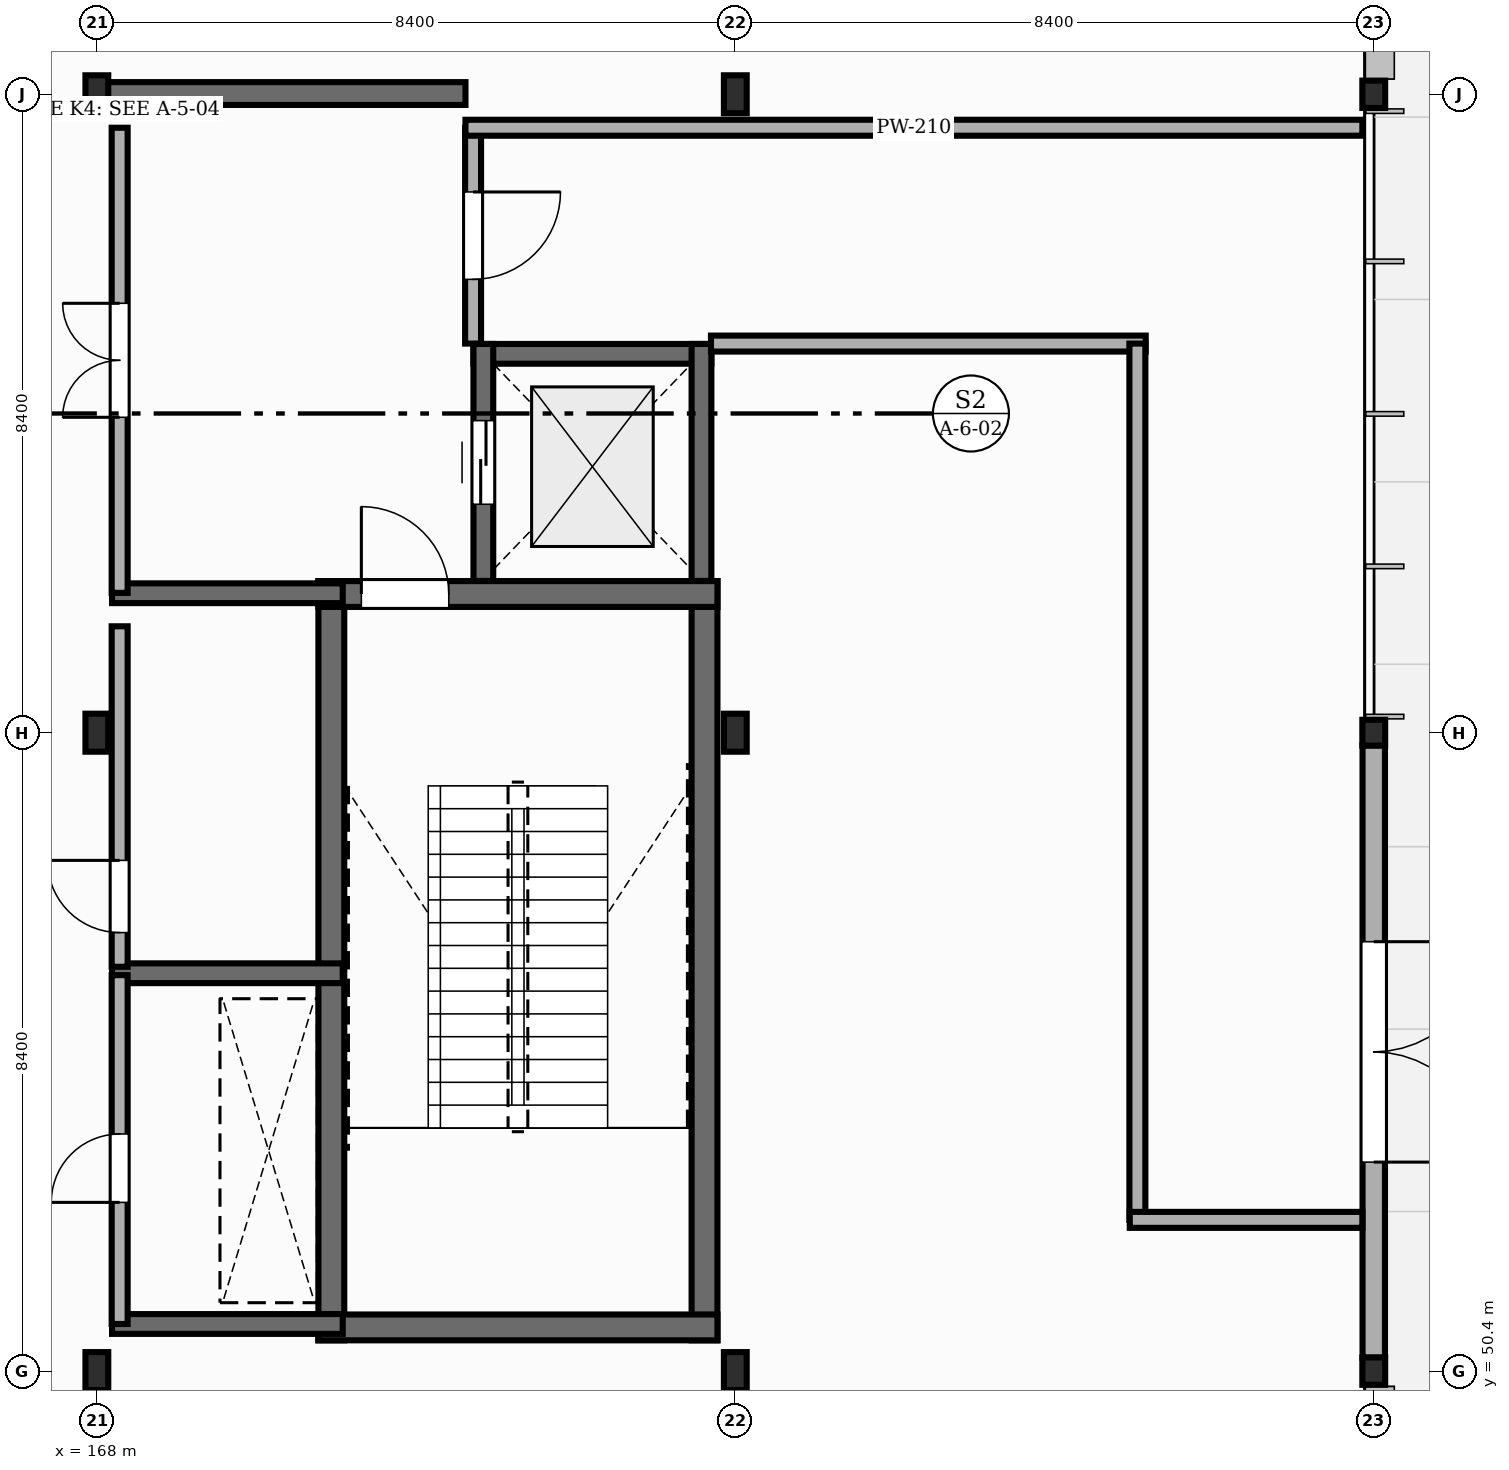
"""IFC4 building model, lengths in metres.
Left out: names, types, materials, properties, quantities, classifications, styles, units other than length and angle.
Written with IfcOpenShell. Run it as: python <this file> out.ifc"""

import sys

from ifc_helpers import new_model, si_unit, direction, frame, frame_2d, origin, origin_2d, place, context, subcontext, project, spatial, rectangle, i_section, extrude, element, fill, save


model = new_model("IFC4")
c1 = context("Model", 3, precision=1e-05, world=origin(), true_north=direction((0.0, 1.0)))
c2 = subcontext(c1, "Body", "Model", "MODEL_VIEW")
j1 = project(units=[si_unit("LENGTHUNIT", "METRE"), si_unit("PLANEANGLEUNIT", "RADIAN")], contexts=[c1])
p1 = place(None, origin())
s1 = spatial("IfcSite", under=j1, at=p1, CompositionType="ELEMENT")
p2 = place(p1, origin())
s2 = spatial("IfcBuilding", under=s1, at=p2, CompositionType="ELEMENT")
p3 = place(p2, origin())
s3 = spatial("IfcBuildingStorey", under=s2, at=p3, CompositionType="ELEMENT", Elevation=0.0)
for number, where, z_axis, x_axis in (
    (1, (168.0, 50.4, 0.0), (0.0, 0.0, 1.0), (1.0, 0.0, 0.0)),
    (2, (168.0, 58.8, 0.0), (0.0, 0.0, 1.0), (1.0, 0.0, 0.0)),
    (3, (168.0, 67.2, 0.0), (0.0, 0.0, 1.0), (1.0, 0.0, 0.0)),
    (4, (176.4, 50.4, 0.0), (0.0, 0.0, 1.0), (1.0, 0.0, 0.0)),
    (5, (176.4, 58.8, 0.0), (0.0, 0.0, 1.0), (1.0, 0.0, 0.0)),
    (6, (176.4, 67.2, 0.0), (0.0, 0.0, 1.0), (1.0, 0.0, 0.0)),
):
    element("IfcColumn", number, at=place(p3, frame(where, z_axis=z_axis, x_axis=x_axis)), inside=s3, PredefinedType="COLUMN", context=c2, shape_type="SweptSolid", body=[
        extrude(i_section(OverallWidth=0.3, OverallDepth=0.5, WebThickness=0.014, FlangeThickness=0.028, FilletRadius=0.027, at=origin_2d()), origin(), (0.0, 0.0, 1.0), 5.4),
    ])
p4 = place(p3, frame((184.8, 50.4, 0.0), z_axis=(0.0, 0.0, 1.0), x_axis=(1.0, 0.0, 0.0)))
e7 = element("IfcColumn", 7, at=p4, inside=s3, PredefinedType="COLUMN", context=c2, shape_type="SweptSolid", body=[
    extrude(i_section(OverallWidth=0.3, OverallDepth=0.36, WebThickness=0.012, FlangeThickness=0.022, FilletRadius=0.027, at=origin_2d()), origin(), (0.0, 0.0, 1.0), 5.4),
])
p5 = place(p3, frame((184.8, 58.8, 0.0), z_axis=(0.0, 0.0, 1.0), x_axis=(1.0, 0.0, 0.0)))
e8 = element("IfcColumn", 8, at=p5, inside=s3, PredefinedType="COLUMN", context=c2, shape_type="SweptSolid", body=[
    extrude(i_section(OverallWidth=0.3, OverallDepth=0.34, WebThickness=0.012, FlangeThickness=0.021, FilletRadius=0.027, at=origin_2d()), origin(), (0.0, 0.0, 1.0), 5.4),
])
p6 = place(p3, frame((184.8, 67.2, 0.0), z_axis=(0.0, 0.0, 1.0), x_axis=(1.0, 0.0, 0.0)))
e9 = element("IfcColumn", 9, at=p6, inside=s3, PredefinedType="COLUMN", context=c2, shape_type="SweptSolid", body=[
    extrude(i_section(OverallWidth=0.3, OverallDepth=0.36, WebThickness=0.012, FlangeThickness=0.022, FilletRadius=0.027, at=origin_2d()), origin(), (0.0, 0.0, 1.0), 5.4),
])
p7 = place(p3, frame((184.8, 58.634, 0.0), z_axis=(0.0, 0.0, 1.0), x_axis=(0.0, -1.0, 0.0)))
e10 = element("IfcWall", 10, at=p7, inside=s3, PredefinedType="STANDARD", context=c2, shape_type="SweptSolid", body=[
    extrude(rectangle(XDim=8.058, YDim=0.295, at=frame_2d((4.029, 0.0))), origin(), (0.0, 0.0, 1.0), 4.797),
])
p8 = place(p7, frame((2.584, 0.0, 0.0)))
e11 = element("IfcOpeningElement", 11, at=p8, cuts=e10, PredefinedType="OPENING", context=c2, shape_type="SweptSolid", body=[
    extrude(rectangle(XDim=2.9, YDim=2.38, at=frame_2d((1.45, 1.19))), frame((0.0, 0.157, 0.0), z_axis=(0.0, -1.0, 0.0), x_axis=(1.0, 0.0, 0.0)), (0.0, 0.0, 1.0), 0.315),
])
for number, where, z_axis, x_axis in (
    (12, (171.085, 50.805, 0.0), (0.0, 0.0, 1.0), (0.0, 1.0, 0.0)),
    (13, (175.995, 50.805, 0.0), (0.0, 0.0, 1.0), (0.0, 1.0, 0.0)),
):
    element("IfcWall", number, at=place(p3, frame(where, z_axis=z_axis, x_axis=x_axis)), inside=s3, PredefinedType="SHEAR", context=c2, shape_type="SweptSolid", body=[
        extrude(rectangle(XDim=9.99, YDim=0.34, at=frame_2d((4.995, 0.0))), origin(), (0.0, 0.0, 1.0), 5.175),
    ])
p9 = place(p3, frame((170.915, 50.975, 0.0), z_axis=(0.0, 0.0, 1.0), x_axis=(1.0, 0.0, 0.0)))
e14 = element("IfcWall", 14, at=p9, inside=s3, PredefinedType="SHEAR", context=c2, shape_type="SweptSolid", body=[
    extrude(rectangle(XDim=5.25, YDim=0.34, at=frame_2d((2.625, 0.0))), origin(), (0.0, 0.0, 1.0), 5.175),
])
p10 = place(p3, frame((170.915, 60.625, 0.0), z_axis=(0.0, 0.0, 1.0), x_axis=(1.0, 0.0, 0.0)))
e15 = element("IfcWall", 15, at=p10, inside=s3, PredefinedType="SHEAR", context=c2, shape_type="SweptSolid", body=[
    extrude(rectangle(XDim=5.25, YDim=0.34, at=frame_2d((2.625, 0.0))), origin(), (0.0, 0.0, 1.0), 5.175),
])
p11 = place(p10, frame((0.565, 0.0, 0.0)))
e16 = element("IfcOpeningElement", 16, at=p11, cuts=e15, PredefinedType="OPENING", context=c2, shape_type="SweptSolid", body=[
    extrude(rectangle(XDim=1.15, YDim=2.15, at=frame_2d((0.575, 1.075))), frame((0.0, 0.18, 0.0), z_axis=(0.0, -1.0, 0.0), x_axis=(1.0, 0.0, 0.0)), (0.0, 0.0, 1.0), 0.36),
])
p12 = place(p3, frame((172.955, 63.785, 0.0), z_axis=(0.0, 0.0, 1.0), x_axis=(1.0, 0.0, 0.0)))
e17 = element("IfcWall", 17, at=p12, inside=s3, PredefinedType="SHEAR", context=c2, shape_type="SweptSolid", body=[
    extrude(rectangle(XDim=3.13, YDim=0.26, at=frame_2d((1.565, 0.0))), origin(), (0.0, 0.0, 1.0), 5.175),
])
p13 = place(p3, frame((175.955, 60.797, 0.0), z_axis=(0.0, 0.0, 1.0), x_axis=(0.0, 1.0, 0.0)))
e18 = element("IfcWall", 18, at=p13, inside=s3, PredefinedType="SHEAR", context=c2, shape_type="SweptSolid", body=[
    extrude(rectangle(XDim=3.118, YDim=0.26, at=frame_2d((1.559, 0.0))), origin(), (0.0, 0.0, 1.0), 5.175),
])
p14 = place(p3, frame((173.085, 60.797, 0.0), z_axis=(0.0, 0.0, 1.0), x_axis=(0.0, 1.0, 0.0)))
e19 = element("IfcWall", 19, at=p14, inside=s3, PredefinedType="SHEAR", context=c2, shape_type="SweptSolid", body=[
    extrude(rectangle(XDim=3.118, YDim=0.26, at=frame_2d((1.559, 0.0))), origin(), (0.0, 0.0, 1.0), 5.175),
])
p15 = place(p14, frame((1.009, 0.0, 0.0)))
e20 = element("IfcOpeningElement", 20, at=p15, cuts=e19, PredefinedType="OPENING", context=c2, shape_type="SweptSolid", body=[
    extrude(rectangle(XDim=1.1, YDim=2.15, at=frame_2d((0.55, 1.075))), frame((0.0, 0.14, 0.0), z_axis=(0.0, -1.0, 0.0), x_axis=(1.0, 0.0, 0.0)), (0.0, 0.0, 1.0), 0.28),
])
for number, where, z_axis, x_axis in (
    (21, (168.2, 51.02, 0.0), (0.0, 0.0, 1.0), (1.0, 0.0, 0.0)),
    (22, (168.2, 55.635, 0.0), (0.0, 0.0, 1.0), (1.0, 0.0, 0.0)),
    (23, (168.2, 60.635, 0.0), (0.0, 0.0, 1.0), (1.0, 0.0, 0.0)),
):
    element("IfcWall", number, at=place(p3, frame(where, z_axis=z_axis, x_axis=x_axis)), inside=s3, PredefinedType="SHEAR", context=c2, shape_type="SweptSolid", body=[
        extrude(rectangle(XDim=3.035, YDim=0.26, at=frame_2d((1.518, 0.0))), origin(), (0.0, 0.0, 1.0), 5.175),
    ])
p16 = place(p3, frame((167.98, 67.21, 0.0), z_axis=(0.0, 0.0, 1.0), x_axis=(1.0, 0.0, 0.0)))
e24 = element("IfcWall", 24, at=p16, inside=s3, PredefinedType="SHEAR", context=c2, shape_type="SweptSolid", body=[
    extrude(rectangle(XDim=4.87, YDim=0.3, at=frame_2d((2.435, 0.0))), origin(), (0.0, 0.0, 1.0), 5.175),
])
p17 = place(p3, frame((168.3, 51.02, 0.0), z_axis=(0.0, 0.0, 1.0), x_axis=(0.0, 1.0, 0.0)))
e25 = element("IfcWall", 25, at=p17, inside=s3, PredefinedType="STANDARD", context=c2, shape_type="SweptSolid", body=[
    extrude(rectangle(XDim=4.59, YDim=0.21, at=frame_2d((2.295, 0.0))), origin(), (0.0, 0.0, 1.0), 4.807),
])
p18 = place(p17, frame((1.6, 0.0, 0.0)))
e26 = element("IfcOpeningElement", 26, at=p18, cuts=e25, PredefinedType="OPENING", context=c2, shape_type="SweptSolid", body=[
    extrude(rectangle(XDim=0.9, YDim=2.1, at=frame_2d((0.45, 1.05))), frame((0.0, 0.115, 0.0), z_axis=(0.0, -1.0, 0.0), x_axis=(1.0, 0.0, 0.0)), (0.0, 0.0, 1.0), 0.23),
])
p19 = place(p3, frame((168.3, 55.72, 0.0), z_axis=(0.0, 0.0, 1.0), x_axis=(0.0, 1.0, 0.0)))
e27 = element("IfcWall", 27, at=p19, inside=s3, PredefinedType="STANDARD", context=c2, shape_type="SweptSolid", body=[
    extrude(rectangle(XDim=4.48, YDim=0.21, at=frame_2d((2.24, 0.0))), origin(), (0.0, 0.0, 1.0), 4.807),
])
p20 = place(p19, frame((0.45, 0.0, 0.0)))
e28 = element("IfcOpeningElement", 28, at=p20, cuts=e27, PredefinedType="OPENING", context=c2, shape_type="SweptSolid", body=[
    extrude(rectangle(XDim=0.95, YDim=2.15, at=frame_2d((0.475, 1.075))), frame((0.0, 0.115, 0.0), z_axis=(0.0, -1.0, 0.0), x_axis=(1.0, 0.0, 0.0)), (0.0, 0.0, 1.0), 0.23),
])
p21 = place(p3, frame((168.3, 60.64, 0.0), z_axis=(0.0, 0.0, 1.0), x_axis=(0.0, 1.0, 0.0)))
e29 = element("IfcWall", 29, at=p21, inside=s3, PredefinedType="STANDARD", context=c2, shape_type="SweptSolid", body=[
    extrude(rectangle(XDim=6.12, YDim=0.21, at=frame_2d((3.06, 0.0))), origin(), (0.0, 0.0, 1.0), 4.847),
])
p22 = place(p21, frame((2.31, 0.0, 0.0)))
e30 = element("IfcOpeningElement", 30, at=p22, cuts=e29, PredefinedType="OPENING", context=c2, shape_type="SweptSolid", body=[
    extrude(rectangle(XDim=1.5, YDim=2.2, at=frame_2d((0.75, 1.1))), frame((0.0, 0.115, 0.0), z_axis=(0.0, -1.0, 0.0), x_axis=(1.0, 0.0, 0.0)), (0.0, 0.0, 1.0), 0.23),
])
p23 = place(p3, frame((172.95, 66.76, 0.0), z_axis=(0.0, 0.0, 1.0), x_axis=(0.0, -1.0, 0.0)))
e31 = element("IfcWall", 31, at=p23, inside=s3, PredefinedType="STANDARD", context=c2, shape_type="SweptSolid", body=[
    extrude(rectangle(XDim=2.84, YDim=0.21, at=frame_2d((1.42, 0.0))), origin(), (0.0, 0.0, 1.0), 5.175),
])
p24 = place(p23, frame((0.845, 0.0, 0.0)))
e32 = element("IfcOpeningElement", 32, at=p24, cuts=e31, PredefinedType="OPENING", context=c2, shape_type="SweptSolid", body=[
    extrude(rectangle(XDim=1.15, YDim=2.15, at=frame_2d((0.575, 1.075))), frame((0.0, 0.115, 0.0), z_axis=(0.0, -1.0, 0.0), x_axis=(1.0, 0.0, 0.0)), (0.0, 0.0, 1.0), 0.23),
])
p25 = place(p3, frame((172.85, 66.76, 0.0), z_axis=(0.0, 0.0, 1.0), x_axis=(1.0, 0.0, 0.0)))
e33 = element("IfcWall", 33, at=p25, inside=s3, PredefinedType="STANDARD", context=c2, shape_type="SweptSolid", body=[
    extrude(rectangle(XDim=11.8, YDim=0.21, at=frame_2d((5.9, 0.0))), origin(), (0.0, 0.0, 1.0), 4.607),
])
p26 = place(p3, frame((176.08, 63.92, 0.0), z_axis=(0.0, 0.0, 1.0), x_axis=(1.0, 0.0, 0.0)))
e34 = element("IfcWall", 34, at=p26, inside=s3, PredefinedType="STANDARD", context=c2, shape_type="SweptSolid", body=[
    extrude(rectangle(XDim=5.72, YDim=0.21, at=frame_2d((2.86, 0.0))), origin(), (0.0, 0.0, 1.0), 5.175),
])
p27 = place(p3, frame((181.69, 63.92, 0.0), z_axis=(0.0, 0.0, 1.0), x_axis=(0.0, -1.0, 0.0)))
e35 = element("IfcWall", 35, at=p27, inside=s3, PredefinedType="STANDARD", context=c2, shape_type="SweptSolid", body=[
    extrude(rectangle(XDim=11.53, YDim=0.21, at=frame_2d((5.765, 0.0))), origin(), (0.0, 0.0, 1.0), 4.887),
])
p28 = place(p3, frame((181.59, 52.39, 0.0), z_axis=(0.0, 0.0, 1.0), x_axis=(1.0, 0.0, 0.0)))
e36 = element("IfcWall", 36, at=p28, inside=s3, PredefinedType="STANDARD", context=c2, shape_type="SweptSolid", body=[
    extrude(rectangle(XDim=3.06, YDim=0.21, at=frame_2d((1.53, 0.0))), origin(), (0.0, 0.0, 1.0), 5.175),
])
p29 = place(p8, origin())
e37 = element("IfcDoor", 37, at=p29, inside=s3, OperationType="DOUBLE_DOOR_SINGLE_SWING", PredefinedType="DOOR", context=c2, shape_type="SweptSolid", body=[
    extrude(rectangle(XDim=2.9, YDim=2.38, at=frame_2d((1.45, 1.19))), frame((0.0, 0.025, 0.0), z_axis=(0.0, -1.0, 0.0), x_axis=(1.0, 0.0, 0.0)), (0.0, 0.0, 1.0), 0.05),
])
fill(e11, e37)
p30 = place(p11, origin())
e38 = element("IfcDoor", 38, at=p30, inside=s3, OperationType="SINGLE_SWING_LEFT", PredefinedType="DOOR", context=c2, shape_type="SweptSolid", body=[
    extrude(rectangle(XDim=1.15, YDim=2.15, at=frame_2d((0.575, 1.075))), frame((0.0, 0.025, 0.0), z_axis=(0.0, -1.0, 0.0), x_axis=(1.0, 0.0, 0.0)), (0.0, 0.0, 1.0), 0.05),
])
fill(e16, e38)
p31 = place(p15, origin())
e39 = element("IfcDoor", 39, at=p31, inside=s3, OperationType="DOUBLE_DOOR_SLIDING", PredefinedType="DOOR", context=c2, shape_type="SweptSolid", body=[
    extrude(rectangle(XDim=1.1, YDim=2.15, at=frame_2d((0.55, 1.075))), frame((0.0, 0.025, 0.0), z_axis=(0.0, -1.0, 0.0), x_axis=(1.0, 0.0, 0.0)), (0.0, 0.0, 1.0), 0.05),
])
fill(e20, e39)
p32 = place(p18, origin())
e40 = element("IfcDoor", 40, at=p32, inside=s3, OperationType="SINGLE_SWING_LEFT", PredefinedType="DOOR", context=c2, shape_type="SweptSolid", body=[
    extrude(rectangle(XDim=0.9, YDim=2.1, at=frame_2d((0.45, 1.05))), frame((0.0, 0.025, 0.0), z_axis=(0.0, -1.0, 0.0), x_axis=(1.0, 0.0, 0.0)), (0.0, 0.0, 1.0), 0.05),
])
fill(e26, e40)
p33 = place(p20, origin())
e41 = element("IfcDoor", 41, at=p33, inside=s3, OperationType="SINGLE_SWING_RIGHT", PredefinedType="DOOR", context=c2, shape_type="SweptSolid", body=[
    extrude(rectangle(XDim=0.95, YDim=2.15, at=frame_2d((0.475, 1.075))), frame((0.0, 0.025, 0.0), z_axis=(0.0, -1.0, 0.0), x_axis=(1.0, 0.0, 0.0)), (0.0, 0.0, 1.0), 0.05),
])
fill(e28, e41)
p34 = place(p22, origin())
e42 = element("IfcDoor", 42, at=p34, inside=s3, OperationType="DOUBLE_DOOR_SINGLE_SWING", PredefinedType="DOOR", context=c2, shape_type="SweptSolid", body=[
    extrude(rectangle(XDim=1.5, YDim=2.2, at=frame_2d((0.75, 1.1))), frame((0.0, 0.025, 0.0), z_axis=(0.0, -1.0, 0.0), x_axis=(1.0, 0.0, 0.0)), (0.0, 0.0, 1.0), 0.05),
])
fill(e30, e42)
p35 = place(p24, origin())
e43 = element("IfcDoor", 43, at=p35, inside=s3, OperationType="SINGLE_SWING_LEFT", PredefinedType="DOOR", context=c2, shape_type="SweptSolid", body=[
    extrude(rectangle(XDim=1.15, YDim=2.15, at=frame_2d((0.575, 1.075))), frame((0.0, 0.025, 0.0), z_axis=(0.0, -1.0, 0.0), x_axis=(1.0, 0.0, 0.0)), (0.0, 0.0, 1.0), 0.05),
])
fill(e32, e43)
save(model, sys.argv[1])
